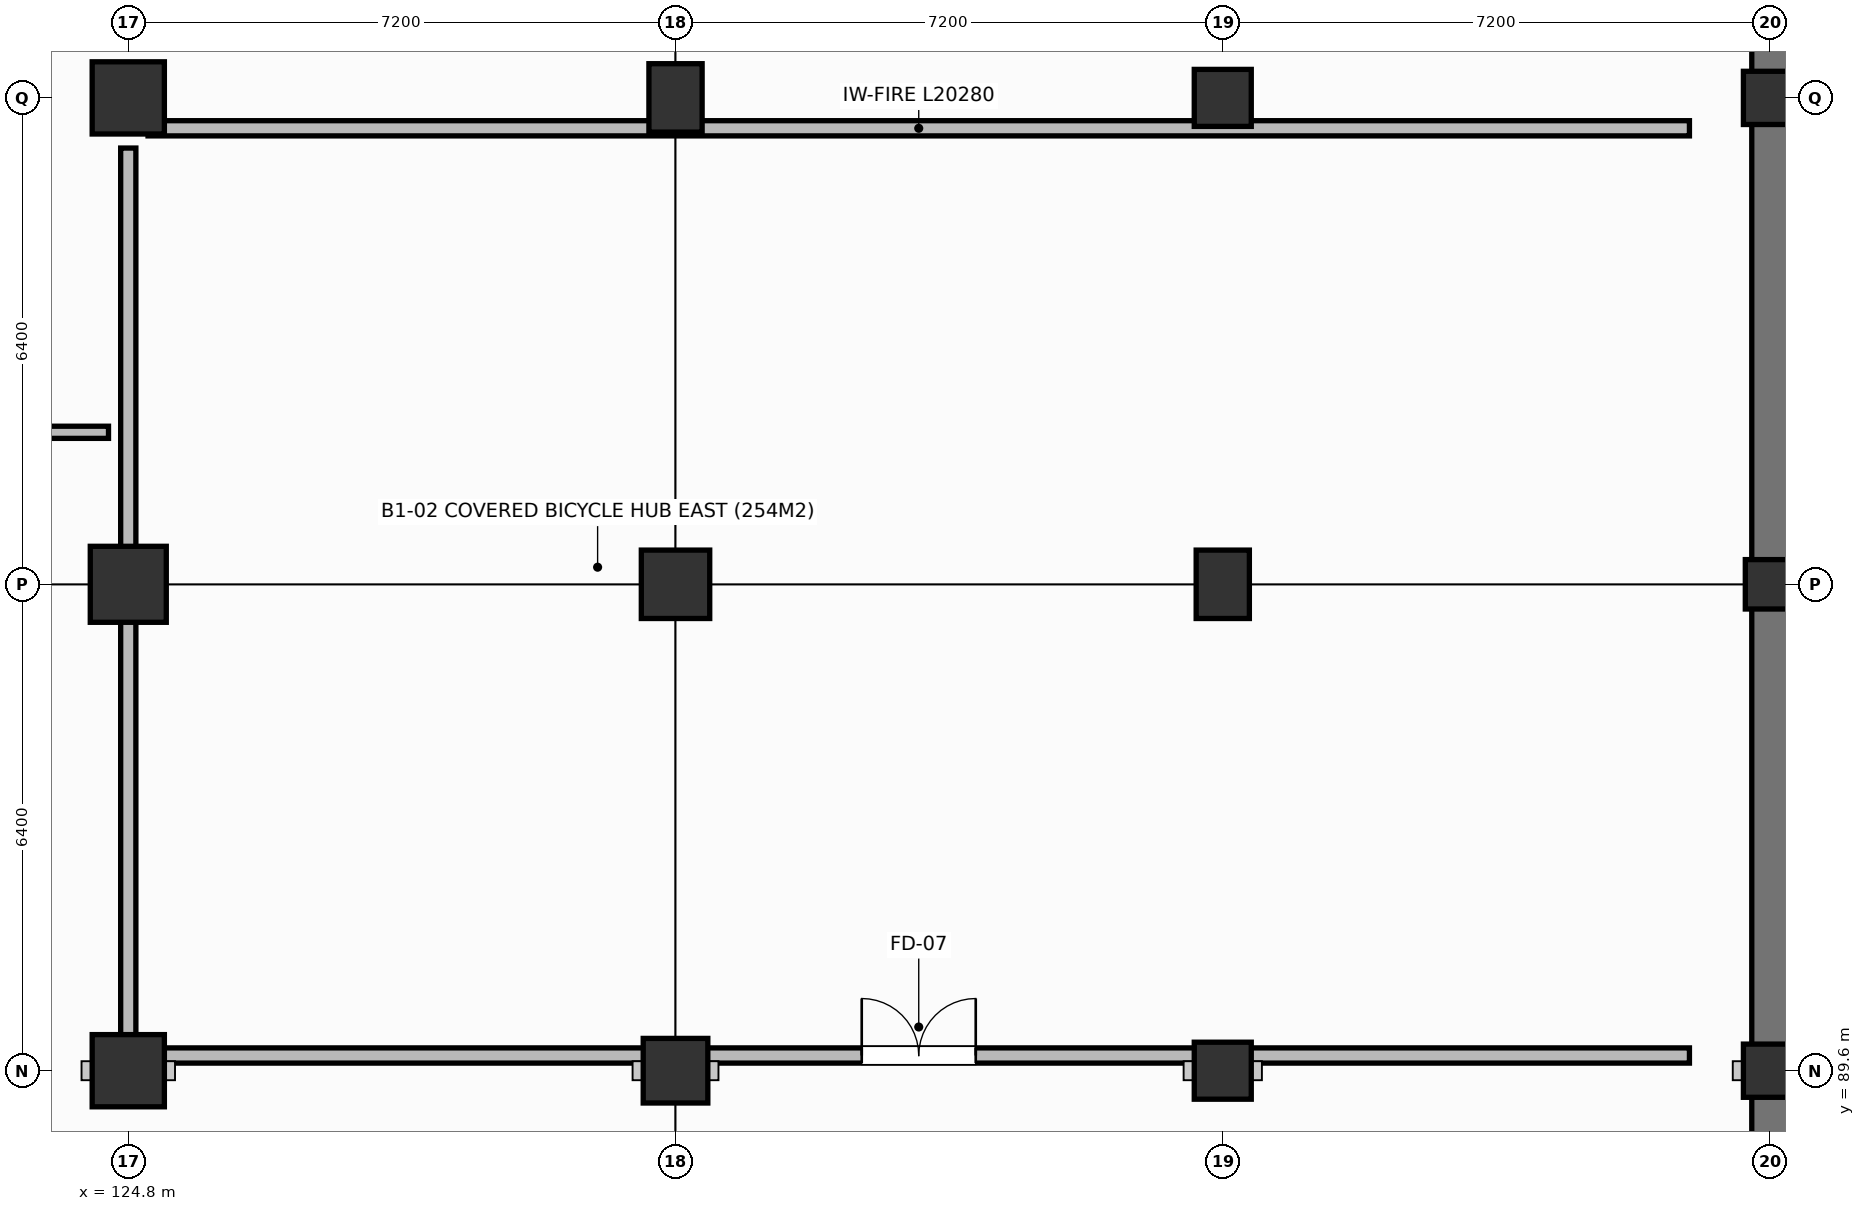
"""IFC4 building model, lengths in metres.
Left out: names, types, materials, properties, quantities, classifications, styles, units other than length and angle.
Written with IfcOpenShell. Run it as: python <this file> out.ifc"""

import sys

from ifc_helpers import new_model, si_unit, direction, frame, frame_2d, origin, origin_2d, place, context, subcontext, project, spatial, rectangle, extrude, element, fill, save


model = new_model("IFC4")
c1 = context("Model", 3, precision=1e-05, world=origin(), true_north=direction((0.0, 1.0)))
c2 = subcontext(c1, "Body", "Model", "MODEL_VIEW")
j1 = project(units=[si_unit("LENGTHUNIT", "METRE"), si_unit("PLANEANGLEUNIT", "RADIAN")], contexts=[c1])
p1 = place(None, origin())
s1 = spatial("IfcSite", under=j1, at=p1, CompositionType="ELEMENT")
p2 = place(p1, origin())
s2 = spatial("IfcBuilding", under=s1, at=p2, CompositionType="ELEMENT")
p3 = place(p2, frame((0.0, 0.0, -4.8)))
s3 = spatial("IfcBuildingStorey", under=s2, at=p3, CompositionType="ELEMENT", Elevation=-4.8)
p4 = place(p3, frame((124.8, 89.6, 0.0), z_axis=(0.0, 0.0, 1.0), x_axis=(1.0, 0.0, 0.0)))
e1 = element("IfcColumn", 1, at=p4, inside=s3, PredefinedType="COLUMN", context=c2, shape_type="SweptSolid", body=[
    extrude(rectangle(XDim=0.95, YDim=0.95, at=origin_2d()), origin(), (0.0, 0.0, 1.0), 4.8),
])
p5 = place(p3, frame((124.8, 96.0, 0.0), z_axis=(0.0, 0.0, 1.0), x_axis=(1.0, 0.0, 0.0)))
e2 = element("IfcColumn", 2, at=p5, inside=s3, PredefinedType="COLUMN", context=c2, shape_type="SweptSolid", body=[
    extrude(rectangle(XDim=1.0, YDim=1.0, at=origin_2d()), origin(), (0.0, 0.0, 1.0), 4.8),
])
p6 = place(p3, frame((124.8, 102.4, 0.0), z_axis=(0.0, 0.0, 1.0), x_axis=(1.0, 0.0, 0.0)))
e3 = element("IfcColumn", 3, at=p6, inside=s3, PredefinedType="COLUMN", context=c2, shape_type="SweptSolid", body=[
    extrude(rectangle(XDim=0.95, YDim=0.95, at=origin_2d()), origin(), (0.0, 0.0, 1.0), 4.8),
])
p7 = place(p3, frame((132.0, 89.6, 0.0), z_axis=(0.0, 0.0, 1.0), x_axis=(1.0, 0.0, 0.0)))
e4 = element("IfcColumn", 4, at=p7, inside=s3, PredefinedType="COLUMN", context=c2, shape_type="SweptSolid", body=[
    extrude(rectangle(XDim=0.85, YDim=0.85, at=origin_2d()), origin(), (0.0, 0.0, 1.0), 4.8),
])
p8 = place(p3, frame((132.0, 96.0, 0.0), z_axis=(0.0, 0.0, 1.0), x_axis=(1.0, 0.0, 0.0)))
e5 = element("IfcColumn", 5, at=p8, inside=s3, PredefinedType="COLUMN", context=c2, shape_type="SweptSolid", body=[
    extrude(rectangle(XDim=0.9, YDim=0.9, at=origin_2d()), origin(), (0.0, 0.0, 1.0), 4.8),
])
p9 = place(p3, frame((132.0, 102.4, 0.0), z_axis=(0.0, 0.0, 1.0), x_axis=(1.0, 0.0, 0.0)))
e6 = element("IfcColumn", 6, at=p9, inside=s3, PredefinedType="COLUMN", context=c2, shape_type="SweptSolid", body=[
    extrude(rectangle(XDim=0.7, YDim=0.9, at=origin_2d()), origin(), (0.0, 0.0, 1.0), 4.8),
])
p10 = place(p3, frame((139.2, 89.6, 0.0), z_axis=(0.0, 0.0, 1.0), x_axis=(1.0, 0.0, 0.0)))
e7 = element("IfcColumn", 7, at=p10, inside=s3, PredefinedType="COLUMN", context=c2, shape_type="SweptSolid", body=[
    extrude(rectangle(XDim=0.75, YDim=0.75, at=origin_2d()), origin(), (0.0, 0.0, 1.0), 4.8),
])
p11 = place(p3, frame((139.2, 96.0, 0.0), z_axis=(0.0, 0.0, 1.0), x_axis=(1.0, 0.0, 0.0)))
e8 = element("IfcColumn", 8, at=p11, inside=s3, PredefinedType="COLUMN", context=c2, shape_type="SweptSolid", body=[
    extrude(rectangle(XDim=0.7, YDim=0.9, at=origin_2d()), origin(), (0.0, 0.0, 1.0), 4.8),
])
p12 = place(p3, frame((139.2, 102.4, 0.0), z_axis=(0.0, 0.0, 1.0), x_axis=(1.0, 0.0, 0.0)))
e9 = element("IfcColumn", 9, at=p12, inside=s3, PredefinedType="COLUMN", context=c2, shape_type="SweptSolid", body=[
    extrude(rectangle(XDim=0.75, YDim=0.75, at=origin_2d()), origin(), (0.0, 0.0, 1.0), 4.8),
])
p13 = place(p3, frame((146.4, 89.6, 0.0), z_axis=(0.0, 0.0, 1.0), x_axis=(1.0, 0.0, 0.0)))
e10 = element("IfcColumn", 10, at=p13, inside=s3, PredefinedType="COLUMN", context=c2, shape_type="SweptSolid", body=[
    extrude(rectangle(XDim=0.7, YDim=0.7, at=origin_2d()), origin(), (0.0, 0.0, 1.0), 4.8),
])
p14 = place(p3, frame((146.4, 96.0, 0.0), z_axis=(0.0, 0.0, 1.0), x_axis=(1.0, 0.0, 0.0)))
e11 = element("IfcColumn", 11, at=p14, inside=s3, PredefinedType="COLUMN", context=c2, shape_type="SweptSolid", body=[
    extrude(rectangle(XDim=0.65, YDim=0.65, at=origin_2d()), origin(), (0.0, 0.0, 1.0), 4.8),
])
p15 = place(p3, frame((146.4, 102.4, 0.0), z_axis=(0.0, 0.0, 1.0), x_axis=(1.0, 0.0, 0.0)))
e12 = element("IfcColumn", 12, at=p15, inside=s3, PredefinedType="COLUMN", context=c2, shape_type="SweptSolid", body=[
    extrude(rectangle(XDim=0.7, YDim=0.7, at=origin_2d()), origin(), (0.0, 0.0, 1.0), 4.8),
])
p16 = place(p3, frame((146.4, 108.8, 0.0), z_axis=(0.0, 0.0, 1.0), x_axis=(0.0, -1.0, 0.0)))
e13 = element("IfcWall", 13, at=p16, inside=s3, PredefinedType="SOLIDWALL", context=c2, shape_type="SweptSolid", body=[
    extrude(rectangle(XDim=6.4, YDim=0.48, at=frame_2d((3.2, 0.0))), origin(), (0.0, 0.0, 1.0), 4.25),
])
for number, where, z_axis, x_axis in (
    (14, (146.4, 102.4, 0.0), (0.0, 0.0, 1.0), (0.0, -1.0, 0.0)),
    (15, (146.4, 96.0, 0.0), (0.0, 0.0, 1.0), (0.0, -1.0, 0.0)),
):
    element("IfcWall", number, at=place(p3, frame(where, z_axis=z_axis, x_axis=x_axis)), inside=s3, PredefinedType="SOLIDWALL", context=c2, shape_type="SweptSolid", body=[
        extrude(rectangle(XDim=6.4, YDim=0.48, at=frame_2d((3.2, 0.0))), origin(), (0.0, 0.0, 1.0), 4.25),
    ])
p17 = place(p3, frame((146.4, 89.6, 0.0), z_axis=(0.0, 0.0, 1.0), x_axis=(0.0, -1.0, 0.0)))
e16 = element("IfcWall", 16, at=p17, inside=s3, PredefinedType="SOLIDWALL", context=c2, shape_type="SweptSolid", body=[
    extrude(rectangle(XDim=6.4, YDim=0.48, at=frame_2d((3.2, 0.0))), origin(), (0.0, 0.0, 1.0), 4.25),
])
p18 = place(p3, frame((125.06, 89.8, 0.0), z_axis=(0.0, 0.0, 1.0), x_axis=(1.0, 0.0, 0.0)))
e17 = element("IfcWall", 17, at=p18, inside=s3, PredefinedType="PARTITIONING", context=c2, shape_type="SweptSolid", body=[
    extrude(rectangle(XDim=20.28, YDim=0.2, at=frame_2d((10.14, 0.0))), origin(), (0.0, 0.0, 1.0), 2.705),
])
p19 = place(p18, frame((9.39, 0.0, 0.0)))
e18 = element("IfcOpeningElement", 18, at=p19, cuts=e17, PredefinedType="OPENING", context=c2, shape_type="SweptSolid", body=[
    extrude(rectangle(XDim=1.5, YDim=2.2, at=frame_2d((0.75, 1.1))), frame((0.0, 0.11, 0.0), z_axis=(0.0, -1.0, 0.0), x_axis=(1.0, 0.0, 0.0)), (0.0, 0.0, 1.0), 0.22),
])
p20 = place(p3, frame((145.34, 102.0, 0.0), z_axis=(0.0, 0.0, 1.0), x_axis=(-1.0, 0.0, 0.0)))
e19 = element("IfcWall", 19, at=p20, inside=s3, PredefinedType="PARTITIONING", context=c2, shape_type="SweptSolid", body=[
    extrude(rectangle(XDim=20.28, YDim=0.2, at=frame_2d((10.14, 0.0))), origin(), (0.0, 0.0, 1.0), 3.475),
])
p21 = place(p3, frame((124.8, 101.74, 0.0), z_axis=(0.0, 0.0, 1.0), x_axis=(0.0, -1.0, 0.0)))
e20 = element("IfcWall", 20, at=p21, inside=s3, PredefinedType="PARTITIONING", context=c2, shape_type="SweptSolid", body=[
    extrude(rectangle(XDim=11.68, YDim=0.2, at=frame_2d((5.84, 0.0))), origin(), (0.0, 0.0, 1.0), 3.175),
])
p22 = place(p3, frame((109.66, 98.0, 0.0), z_axis=(0.0, 0.0, 1.0), x_axis=(1.0, 0.0, 0.0)))
e21 = element("IfcWall", 21, at=p22, inside=s3, PredefinedType="PARTITIONING", context=c2, shape_type="SweptSolid", body=[
    extrude(rectangle(XDim=14.88, YDim=0.16, at=frame_2d((7.44, 0.0))), origin(), (0.0, 0.0, 1.0), 4.25),
])
p23 = place(p22, frame((6.84, 0.0, 0.0)))
e22 = element("IfcOpeningElement", 22, at=p23, cuts=e21, PredefinedType="OPENING", context=c2, shape_type="SweptSolid", body=[
    extrude(rectangle(XDim=1.2, YDim=2.15, at=frame_2d((0.6, 1.075))), frame((0.0, 0.09, 0.0), z_axis=(0.0, -1.0, 0.0), x_axis=(1.0, 0.0, 0.0)), (0.0, 0.0, 1.0), 0.18),
])
p24 = place(p19, origin())
e23 = element("IfcDoor", 23, at=p24, inside=s3, OperationType="DOUBLE_DOOR_SINGLE_SWING", PredefinedType="DOOR", context=c2, shape_type="SweptSolid", body=[
    extrude(rectangle(XDim=1.5, YDim=2.2, at=frame_2d((0.75, 1.1))), frame((0.0, 0.025, 0.0), z_axis=(0.0, -1.0, 0.0), x_axis=(1.0, 0.0, 0.0)), (0.0, 0.0, 1.0), 0.05),
])
fill(e18, e23)
save(model, sys.argv[1])
